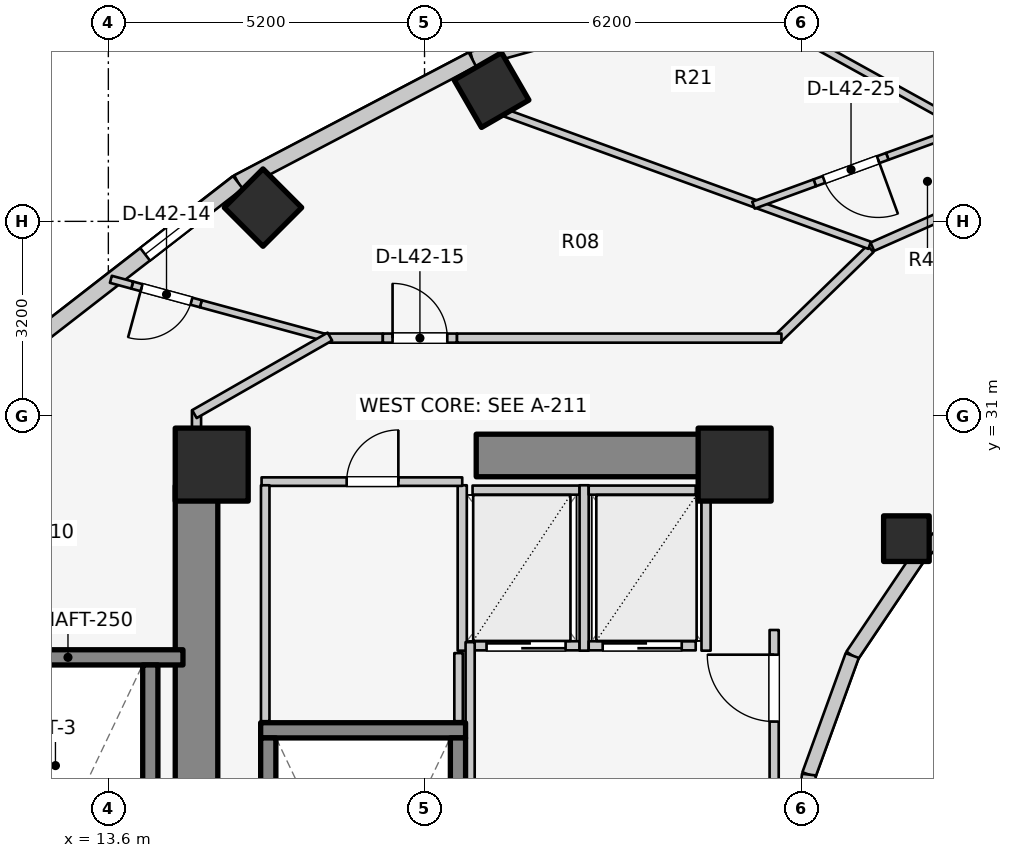
"""IFC4 building model, lengths in metres.
Left out: names, types, materials, properties, quantities, classifications, styles, units other than length and angle.
Written with IfcOpenShell. Run it as: python <this file> out.ifc"""

import sys

from ifc_helpers import new_model, si_unit, direction, frame, frame_2d, origin, origin_2d, place, context, subcontext, project, spatial, rectangle, extrude, element, fill, save


model = new_model("IFC4")
c1 = context("Model", 3, precision=1e-05, world=origin(), true_north=direction((0.0, 1.0)))
c2 = subcontext(c1, "Body", "Model", "MODEL_VIEW")
j1 = project(units=[si_unit("LENGTHUNIT", "METRE"), si_unit("PLANEANGLEUNIT", "RADIAN")], contexts=[c1])
p1 = place(None, origin())
s1 = spatial("IfcSite", under=j1, at=p1, CompositionType="ELEMENT")
p2 = place(p1, origin())
s2 = spatial("IfcBuilding", under=s1, at=p2, CompositionType="ELEMENT")
p3 = place(p2, frame((0.0, 0.0, 140.5)))
s3 = spatial("IfcBuildingStorey", under=s2, at=p3, CompositionType="ELEMENT", Elevation=140.5)
p4 = place(p3, frame((15.05, 17.05, 0.0), z_axis=(0.0, 0.0, 1.0), x_axis=(0.0, 1.0, 0.0)))
e1 = element("IfcWall", 1, at=p4, inside=s3, PredefinedType="SHEAR", context=c2, shape_type="SweptSolid", body=[
    extrude(rectangle(XDim=12.8, YDim=0.7, at=frame_2d((6.4, 0.0))), origin(), (0.0, 0.0, 1.0), 3.1),
])
p5 = place(p3, frame((19.65, 30.35, 0.0), z_axis=(0.0, 0.0, 1.0), x_axis=(1.0, 0.0, 0.0)))
e2 = element("IfcWall", 2, at=p5, inside=s3, PredefinedType="SHEAR", context=c2, shape_type="SweptSolid", body=[
    extrude(rectangle(XDim=4.5, YDim=0.7, at=frame_2d((2.25, 0.0))), origin(), (0.0, 0.0, 1.0), 3.1),
])
p6 = place(p3, frame((16.105, 25.83, 0.0), z_axis=(0.0, 0.0, 1.0), x_axis=(1.0, 0.0, 0.0)))
e3 = element("IfcWall", 3, at=p6, inside=s3, PredefinedType="SOLIDWALL", context=c2, shape_type="SweptSolid", body=[
    extrude(rectangle(XDim=3.37, YDim=0.25, at=frame_2d((1.685, 0.0))), origin(), (0.0, 0.0, 1.0), 3.1),
])
for number, where, z_axis, x_axis in (
    (4, (16.23, 17.895, 0.0), (0.0, 0.0, 1.0), (0.0, 1.0, 0.0)),
    (5, (19.35, 17.895, 0.0), (0.0, 0.0, 1.0), (0.0, 1.0, 0.0)),
):
    element("IfcWall", number, at=place(p3, frame(where, z_axis=z_axis, x_axis=x_axis)), inside=s3, PredefinedType="SOLIDWALL", context=c2, shape_type="SweptSolid", body=[
        extrude(rectangle(XDim=7.81, YDim=0.25, at=frame_2d((3.905, 0.0))), origin(), (0.0, 0.0, 1.0), 3.1),
    ])
p7 = place(p3, frame((11.045, 27.03, 0.0), z_axis=(0.0, 0.0, 1.0), x_axis=(1.0, 0.0, 0.0)))
e6 = element("IfcWall", 6, at=p7, inside=s3, PredefinedType="SOLIDWALL", context=c2, shape_type="SweptSolid", body=[
    extrude(rectangle(XDim=3.782, YDim=0.25, at=frame_2d((1.891, 0.0))), origin(), (0.0, 0.0, 1.0), 3.1),
])
p8 = place(p3, frame((14.29, 19.095, 0.0), z_axis=(0.0, 0.0, 1.0), x_axis=(0.0, 1.0, 0.0)))
e7 = element("IfcWall", 7, at=p8, inside=s3, PredefinedType="SOLIDWALL", context=c2, shape_type="SweptSolid", body=[
    extrude(rectangle(XDim=7.81, YDim=0.25, at=frame_2d((3.905, 0.0))), origin(), (0.0, 0.0, 1.0), 3.1),
])
for number, where, z_axis, x_axis in (
    (8, (23.9, 30.2, 0.0), (0.0, 0.0, 1.0), (1.0, 0.0, 0.0)),
    (9, (15.3, 30.2, 0.0), (0.0, 0.0, 1.0), (1.0, 0.0, 0.0)),
):
    element("IfcColumn", number, at=place(p3, frame(where, z_axis=z_axis, x_axis=x_axis)), inside=s3, PredefinedType="COLUMN", context=c2, shape_type="SweptSolid", body=[
        extrude(rectangle(XDim=1.2, YDim=1.2, at=origin_2d()), origin(), (0.0, 0.0, 1.0), 3.1),
    ])
p9 = place(p3, frame((19.902, 36.359, 0.0), z_axis=(0.0, 0.0, 1.0), x_axis=(-0.5, 0.866025403784, 0.0)))
e10 = element("IfcColumn", 10, at=p9, inside=s3, PredefinedType="COLUMN", context=c2, shape_type="SweptSolid", body=[
    extrude(rectangle(XDim=0.9, YDim=0.9, at=origin_2d()), origin(), (0.0, 0.0, 1.0), 3.1),
])
p10 = place(p3, frame((26.725, 28.982, 0.0), z_axis=(0.0, 0.0, 1.0), x_axis=(1.0, 0.0, 0.0)))
e11 = element("IfcColumn", 11, at=p10, inside=s3, PredefinedType="COLUMN", context=c2, shape_type="SweptSolid", body=[
    extrude(rectangle(XDim=0.75, YDim=0.75, at=origin_2d()), origin(), (0.0, 0.0, 1.0), 3.1),
])
p11 = place(p3, frame((16.143, 34.427, 0.0), z_axis=(0.0, 0.0, 1.0), x_axis=(-0.707106781187, 0.707106781187, 0.0)))
e12 = element("IfcColumn", 12, at=p11, inside=s3, PredefinedType="COLUMN", context=c2, shape_type="SweptSolid", body=[
    extrude(rectangle(XDim=0.9, YDim=0.9, at=origin_2d()), origin(), (0.0, 0.0, 1.0), 3.1),
])
p12 = place(p3, frame((28.44, 30.032, 0.0), z_axis=(0.0, 0.0, 1.0), x_axis=(-0.752576694707, -0.658504607869, 0.0)))
e13 = element("IfcWall", 13, at=p12, inside=s3, PredefinedType="STANDARD", context=c2, shape_type="SweptSolid", body=[
    extrude(rectangle(XDim=1.959, YDim=0.23, at=frame_2d((0.98, 0.0))), origin(), (0.0, 0.0, 1.0), 1.22),
])
p13 = place(p3, frame((26.965, 28.742, 0.0), z_axis=(0.0, 0.0, 1.0), x_axis=(-0.558197800898, -0.829707909492, 0.0)))
e14 = element("IfcWall", 14, at=p13, inside=s3, PredefinedType="STANDARD", context=c2, shape_type="SweptSolid", body=[
    extrude(rectangle(XDim=2.027, YDim=0.23, at=frame_2d((1.013, 0.0))), origin(), (0.0, 0.0, 1.0), 1.22),
])
p14 = place(p3, frame((25.834, 27.06, 0.0), z_axis=(0.0, 0.0, 1.0), x_axis=(-0.341423187295, -0.93990968033, 0.0)))
e15 = element("IfcWall", 15, at=p14, inside=s3, PredefinedType="STANDARD", context=c2, shape_type="SweptSolid", body=[
    extrude(rectangle(XDim=2.084, YDim=0.23, at=frame_2d((1.042, 0.0))), origin(), (0.0, 0.0, 1.0), 2.56),
])
p15 = place(p3, frame((25.123, 25.102, 0.0), z_axis=(0.0, 0.0, 1.0), x_axis=(-0.114711713601, -0.993398823617, 0.0)))
e16 = element("IfcWall", 16, at=p15, inside=s3, PredefinedType="STANDARD", context=c2, shape_type="SweptSolid", body=[
    extrude(rectangle(XDim=2.115, YDim=0.23, at=frame_2d((1.058, 0.0))), origin(), (0.0, 0.0, 1.0), 2.56),
])
p16 = place(p3, frame((24.635, 38.257, 0.0), z_axis=(0.0, 0.0, 1.0), x_axis=(-0.963953455704, -0.26607092144, 0.0)))
e17 = element("IfcWall", 17, at=p16, inside=s3, PredefinedType="STANDARD", context=c2, shape_type="SweptSolid", body=[
    extrude(rectangle(XDim=5.237, YDim=0.26, at=frame_2d((2.618, 0.0))), origin(), (0.0, 0.0, 1.0), 1.22),
])
p17 = place(p16, frame((2.018, 0.0, 0.15)))
e18 = element("IfcOpeningElement", 18, at=p17, cuts=e17, PredefinedType="OPENING", context=c2, shape_type="SweptSolid", body=[
    extrude(rectangle(XDim=1.2, YDim=0.9, at=frame_2d((0.6, 0.45))), frame((0.0, 0.14, 0.0), z_axis=(0.0, -1.0, 0.0), x_axis=(1.0, 0.0, 0.0)), (0.0, 0.0, 1.0), 0.28),
])
p18 = place(p3, frame((19.587, 36.863, 0.0), z_axis=(0.0, 0.0, 1.0), x_axis=(-0.885660265226, -0.464333818065, 0.0)))
e19 = element("IfcWall", 19, at=p18, inside=s3, PredefinedType="STANDARD", context=c2, shape_type="SweptSolid", body=[
    extrude(rectangle(XDim=4.354, YDim=0.26, at=frame_2d((2.177, 0.0))), origin(), (0.0, 0.0, 1.0), 1.22),
])
p19 = place(p3, frame((15.731, 34.842, 0.0), z_axis=(0.0, 0.0, 1.0), x_axis=(-0.790185650662, -0.612867552973, 0.0)))
e20 = element("IfcWall", 20, at=p19, inside=s3, PredefinedType="STANDARD", context=c2, shape_type="SweptSolid", body=[
    extrude(rectangle(XDim=4.239, YDim=0.26, at=frame_2d((2.12, 0.0))), origin(), (0.0, 0.0, 1.0), 1.22),
])
p20 = place(p19, frame((0.731, 0.0, 0.15)))
e21 = element("IfcOpeningElement", 21, at=p20, cuts=e20, PredefinedType="OPENING", context=c2, shape_type="SweptSolid", body=[
    extrude(rectangle(XDim=1.2, YDim=0.9, at=frame_2d((0.6, 0.45))), frame((0.0, 0.14, 0.0), z_axis=(0.0, -1.0, 0.0), x_axis=(1.0, 0.0, 0.0)), (0.0, 0.0, 1.0), 0.28),
])
p21 = place(p3, frame((19.59, 27.22, 0.0), z_axis=(0.0, 0.0, 1.0), x_axis=(1.0, 0.0, 0.0)))
e22 = element("IfcWall", 22, at=p21, inside=s3, PredefinedType="SOLIDWALL", context=c2, shape_type="SweptSolid", body=[
    extrude(rectangle(XDim=1.76, YDim=0.15, at=frame_2d((0.88, 0.0))), origin(), (0.0, 0.0, 1.0), 2.575),
])
p22 = place(p21, frame((0.23, 0.0, 0.0)))
e23 = element("IfcOpeningElement", 23, at=p22, cuts=e22, PredefinedType="OPENING", context=c2, shape_type="SweptSolid", body=[
    extrude(rectangle(XDim=1.3, YDim=2.1, at=frame_2d((0.65, 1.05))), frame((0.0, 0.085, 0.0), z_axis=(0.0, -1.0, 0.0), x_axis=(1.0, 0.0, 0.0)), (0.0, 0.0, 1.0), 0.17),
])
p23 = place(p3, frame((19.59, 29.78, 0.0), z_axis=(0.0, 0.0, 1.0), x_axis=(1.0, 0.0, 0.0)))
e24 = element("IfcWall", 24, at=p23, inside=s3, PredefinedType="SOLIDWALL", context=c2, shape_type="SweptSolid", body=[
    extrude(rectangle(XDim=1.76, YDim=0.15, at=frame_2d((0.88, 0.0))), origin(), (0.0, 0.0, 1.0), 2.575),
])
for number, where, z_axis, x_axis in (
    (25, (19.42, 27.14, 0.0), (0.0, 0.0, 1.0), (0.0, 1.0, 0.0)),
    (26, (21.425, 27.14, 0.0), (0.0, 0.0, 1.0), (0.0, 1.0, 0.0)),
):
    element("IfcWall", number, at=place(p3, frame(where, z_axis=z_axis, x_axis=x_axis)), inside=s3, PredefinedType="SOLIDWALL", context=c2, shape_type="SweptSolid", body=[
        extrude(rectangle(XDim=2.72, YDim=0.15, at=frame_2d((1.36, 0.0))), origin(), (0.0, 0.0, 1.0), 2.575),
    ])
p24 = place(p3, frame((21.5, 27.22, 0.0), z_axis=(0.0, 0.0, 1.0), x_axis=(1.0, 0.0, 0.0)))
e27 = element("IfcWall", 27, at=p24, inside=s3, PredefinedType="SOLIDWALL", context=c2, shape_type="SweptSolid", body=[
    extrude(rectangle(XDim=1.76, YDim=0.15, at=frame_2d((0.88, 0.0))), origin(), (0.0, 0.0, 1.0), 2.575),
])
p25 = place(p24, frame((0.23, 0.0, 0.0)))
e28 = element("IfcOpeningElement", 28, at=p25, cuts=e27, PredefinedType="OPENING", context=c2, shape_type="SweptSolid", body=[
    extrude(rectangle(XDim=1.3, YDim=2.1, at=frame_2d((0.65, 1.05))), frame((0.0, 0.085, 0.0), z_axis=(0.0, -1.0, 0.0), x_axis=(1.0, 0.0, 0.0)), (0.0, 0.0, 1.0), 0.17),
])
p26 = place(p3, frame((21.5, 29.78, 0.0), z_axis=(0.0, 0.0, 1.0), x_axis=(1.0, 0.0, 0.0)))
e29 = element("IfcWall", 29, at=p26, inside=s3, PredefinedType="SOLIDWALL", context=c2, shape_type="SweptSolid", body=[
    extrude(rectangle(XDim=1.76, YDim=0.15, at=frame_2d((0.88, 0.0))), origin(), (0.0, 0.0, 1.0), 2.575),
])
p27 = place(p3, frame((23.43, 27.14, 0.0), z_axis=(0.0, 0.0, 1.0), x_axis=(0.0, 1.0, 0.0)))
e30 = element("IfcWall", 30, at=p27, inside=s3, PredefinedType="SOLIDWALL", context=c2, shape_type="SweptSolid", body=[
    extrude(rectangle(XDim=2.72, YDim=0.15, at=frame_2d((1.36, 0.0))), origin(), (0.0, 0.0, 1.0), 2.575),
])
p28 = place(p3, frame((19.55, 24.08, 0.0), z_axis=(0.0, 0.0, 1.0), x_axis=(0.0, 1.0, 0.0)))
e31 = element("IfcWall", 31, at=p28, inside=s3, PredefinedType="PARTITIONING", context=c2, shape_type="SweptSolid", body=[
    extrude(rectangle(XDim=3.2, YDim=0.15, at=frame_2d((1.6, 0.0))), origin(), (0.0, 0.0, 1.0), 2.575),
])
p29 = place(p3, frame((24.55, 24.08, 0.0), z_axis=(0.0, 0.0, 1.0), x_axis=(0.0, 1.0, 0.0)))
e32 = element("IfcWall", 32, at=p29, inside=s3, PredefinedType="PARTITIONING", context=c2, shape_type="SweptSolid", body=[
    extrude(rectangle(XDim=3.4, YDim=0.15, at=frame_2d((1.7, 0.0))), origin(), (0.0, 0.0, 1.0), 2.575),
])
p30 = place(p29, frame((1.894, 0.0, 0.0)))
e33 = element("IfcOpeningElement", 33, at=p30, cuts=e32, PredefinedType="OPENING", context=c2, shape_type="SweptSolid", body=[
    extrude(rectangle(XDim=1.1, YDim=2.1, at=frame_2d((0.55, 1.05))), frame((0.0, 0.085, 0.0), z_axis=(0.0, -1.0, 0.0), x_axis=(1.0, 0.0, 0.0)), (0.0, 0.0, 1.0), 0.17),
])
p31 = place(p3, frame((16.12, 29.92, 0.0), z_axis=(0.0, 0.0, 1.0), x_axis=(1.0, 0.0, 0.0)))
e34 = element("IfcWall", 34, at=p31, inside=s3, PredefinedType="PLUMBINGWALL", context=c2, shape_type="SweptSolid", body=[
    extrude(rectangle(XDim=3.3, YDim=0.14, at=frame_2d((1.65, 0.0))), origin(), (0.0, 0.0, 1.0), 2.575),
])
p32 = place(p31, frame((1.399, 0.0, 0.0)))
e35 = element("IfcOpeningElement", 35, at=p32, cuts=e34, PredefinedType="OPENING", context=c2, shape_type="SweptSolid", body=[
    extrude(rectangle(XDim=0.85, YDim=2.05, at=frame_2d((0.425, 1.025))), frame((0.0, 0.08, 0.0), z_axis=(0.0, -1.0, 0.0), x_axis=(1.0, 0.0, 0.0)), (0.0, 0.0, 1.0), 0.16),
])
p33 = place(p3, frame((16.18, 25.98, 0.0), z_axis=(0.0, 0.0, 1.0), x_axis=(0.0, 1.0, 0.0)))
e36 = element("IfcWall", 36, at=p33, inside=s3, PredefinedType="PLUMBINGWALL", context=c2, shape_type="SweptSolid", body=[
    extrude(rectangle(XDim=3.88, YDim=0.14, at=frame_2d((1.94, 0.0))), origin(), (0.0, 0.0, 1.0), 2.575),
])
p34 = place(p3, frame((19.36, 25.98, 0.0), z_axis=(0.0, 0.0, 1.0), x_axis=(0.0, 1.0, 0.0)))
e37 = element("IfcWall", 37, at=p34, inside=s3, PredefinedType="PLUMBINGWALL", context=c2, shape_type="SweptSolid", body=[
    extrude(rectangle(XDim=1.12, YDim=0.14, at=frame_2d((0.56, 0.0))), origin(), (0.0, 0.0, 1.0), 2.575),
])
p35 = place(p3, frame((15.05, 29.8, 0.0), z_axis=(0.0, 0.0, 1.0), x_axis=(0.0, 1.0, 0.0)))
e38 = element("IfcWall", 38, at=p35, inside=s3, PredefinedType="PARTITIONING", context=c2, shape_type="SweptSolid", body=[
    extrude(rectangle(XDim=1.29, YDim=0.15, at=frame_2d((0.645, 0.0))), origin(), (0.0, 0.0, 1.0), 1.22),
])
p36 = place(p3, frame((17.248, 32.267, 0.0), z_axis=(0.0, 0.0, 1.0), x_axis=(-0.964996026859, 0.262264500356, 0.0)))
e39 = element("IfcWall", 39, at=p36, inside=s3, PredefinedType="MOVABLE", context=c2, shape_type="SweptSolid", body=[
    extrude(rectangle(XDim=2.204, YDim=0.12, at=frame_2d((1.102, 0.0))), origin(), (0.0, 0.0, 1.0), 1.22),
])
p37 = place(p3, frame((15.121, 32.845, 0.0), z_axis=(0.0, 0.0, 1.0), x_axis=(-0.964994566257, 0.262269874548, 0.0)))
e40 = element("IfcWall", 40, at=p37, inside=s3, PredefinedType="MOVABLE", context=c2, shape_type="SweptSolid", body=[
    extrude(rectangle(XDim=1.17, YDim=0.12, at=frame_2d((0.585, 0.0))), origin(), (0.0, 0.0, 1.0), 2.575),
])
p38 = place(p37, frame((0.16, 0.0, 0.0)))
e41 = element("IfcOpeningElement", 41, at=p38, cuts=e40, PredefinedType="OPENING", context=c2, shape_type="SweptSolid", body=[
    extrude(rectangle(XDim=0.85, YDim=2.05, at=frame_2d((0.425, 1.025))), frame((0.0, 0.07, 0.0), z_axis=(0.0, -1.0, 0.0), x_axis=(1.0, 0.0, 0.0)), (0.0, 0.0, 1.0), 0.14),
])
p39 = place(p3, frame((13.992, 33.152, 0.0), z_axis=(0.0, 0.0, 1.0), x_axis=(-0.964996222189, 0.26226378164, 0.0)))
e42 = element("IfcWall", 42, at=p39, inside=s3, PredefinedType="MOVABLE", context=c2, shape_type="SweptSolid", body=[
    extrude(rectangle(XDim=0.363, YDim=0.12, at=frame_2d((0.182, 0.0))), origin(), (0.0, 0.0, 1.0), 2.575),
])
p40 = place(p3, frame((26.133, 33.749, 0.0), z_axis=(0.0, 0.0, 1.0), x_axis=(-0.717419568599, -0.696641344302, 0.0)))
e43 = element("IfcWall", 43, at=p40, inside=s3, PredefinedType="PARTITIONING", context=c2, shape_type="SweptSolid", body=[
    extrude(rectangle(XDim=2.138, YDim=0.15, at=frame_2d((1.069, 0.0))), origin(), (0.0, 0.0, 1.0), 1.22),
])
p41 = place(p3, frame((17.15, 32.28, 0.0), z_axis=(0.0, 0.0, 1.0), x_axis=(1.0, 0.0, 0.0)))
e44 = element("IfcWall", 44, at=p41, inside=s3, PredefinedType="PARTITIONING", context=c2, shape_type="SweptSolid", body=[
    extrude(rectangle(XDim=0.964, YDim=0.15, at=frame_2d((0.482, 0.0))), origin(), (0.0, 0.0, 1.0), 2.575),
])
p42 = place(p3, frame((18.114, 32.28, 0.0), z_axis=(0.0, 0.0, 1.0), x_axis=(1.0, 0.0, 0.0)))
e45 = element("IfcWall", 45, at=p42, inside=s3, PredefinedType="PARTITIONING", context=c2, shape_type="SweptSolid", body=[
    extrude(rectangle(XDim=1.22, YDim=0.15, at=frame_2d((0.61, 0.0))), origin(), (0.0, 0.0, 1.0), 2.16),
])
p43 = place(p42, frame((0.16, 0.0, 0.0)))
e46 = element("IfcOpeningElement", 46, at=p43, cuts=e45, PredefinedType="OPENING", context=c2, shape_type="SweptSolid", body=[
    extrude(rectangle(XDim=0.9, YDim=2.1, at=frame_2d((0.45, 1.05))), frame((0.0, 0.085, 0.0), z_axis=(0.0, -1.0, 0.0), x_axis=(1.0, 0.0, 0.0)), (0.0, 0.0, 1.0), 0.17),
])
p44 = place(p3, frame((19.334, 32.28, 0.0), z_axis=(0.0, 0.0, 1.0), x_axis=(1.0, 0.0, 0.0)))
e47 = element("IfcWall", 47, at=p44, inside=s3, PredefinedType="PARTITIONING", context=c2, shape_type="SweptSolid", body=[
    extrude(rectangle(XDim=5.336, YDim=0.15, at=frame_2d((2.668, 0.0))), origin(), (0.0, 0.0, 1.0), 1.22),
])
p45 = place(p3, frame((17.243, 32.305, 0.0), z_axis=(0.0, 0.0, 1.0), x_axis=(-0.867991349648, -0.496579315857, 0.0)))
e48 = element("IfcWall", 48, at=p45, inside=s3, PredefinedType="PARTITIONING", context=c2, shape_type="SweptSolid", body=[
    extrude(rectangle(XDim=2.567, YDim=0.15, at=frame_2d((1.283, 0.0))), origin(), (0.0, 0.0, 1.0), 1.22),
])
p46 = place(p3, frame((28.935, 35.058, 0.0), z_axis=(0.0, 0.0, 1.0), x_axis=(-0.875077338582, 0.48398311076, 0.0)))
e49 = element("IfcWall", 49, at=p46, inside=s3, PredefinedType="PARTITIONING", context=c2, shape_type="SweptSolid", body=[
    extrude(rectangle(XDim=4.573, YDim=0.125, at=frame_2d((2.287, 0.0))), origin(), (0.0, 0.0, 1.0), 1.22),
])
p47 = place(p3, frame((26.12, 33.806, 0.0), z_axis=(0.0, 0.0, 1.0), x_axis=(-0.939901628116, 0.341445353557, 0.0)))
e50 = element("IfcWall", 50, at=p47, inside=s3, PredefinedType="PARTITIONING", context=c2, shape_type="SweptSolid", body=[
    extrude(rectangle(XDim=6.387, YDim=0.125, at=frame_2d((3.194, 0.0))), origin(), (0.0, 0.0, 1.0), 1.22),
])
p48 = place(p3, frame((27.749, 35.757, 0.0), z_axis=(0.0, 0.0, 1.0), x_axis=(-0.939467704653, -0.342637464259, 0.0)))
e51 = element("IfcWall", 51, at=p48, inside=s3, PredefinedType="MOVABLE", context=c2, shape_type="SweptSolid", body=[
    extrude(rectangle(XDim=1.424, YDim=0.12, at=frame_2d((0.712, 0.0))), origin(), (0.0, 0.0, 1.0), 1.22),
])
p49 = place(p3, frame((26.411, 35.269, 0.0), z_axis=(0.0, 0.0, 1.0), x_axis=(-0.939428071916, -0.34274611259, 0.0)))
e52 = element("IfcWall", 52, at=p49, inside=s3, PredefinedType="MOVABLE", context=c2, shape_type="SweptSolid", body=[
    extrude(rectangle(XDim=1.27, YDim=0.12, at=frame_2d((0.635, 0.0))), origin(), (0.0, 0.0, 1.0), 2.16),
])
p50 = place(p49, frame((0.16, 0.0, 0.0)))
e53 = element("IfcOpeningElement", 53, at=p50, cuts=e52, PredefinedType="OPENING", context=c2, shape_type="SweptSolid", body=[
    extrude(rectangle(XDim=0.95, YDim=2.1, at=frame_2d((0.475, 1.05))), frame((0.0, 0.07, 0.0), z_axis=(0.0, -1.0, 0.0), x_axis=(1.0, 0.0, 0.0)), (0.0, 0.0, 1.0), 0.14),
])
p51 = place(p3, frame((25.218, 34.834, 0.0), z_axis=(0.0, 0.0, 1.0), x_axis=(-0.939387563121, -0.342857122214, 0.0)))
e54 = element("IfcWall", 54, at=p51, inside=s3, PredefinedType="MOVABLE", context=c2, shape_type="SweptSolid", body=[
    extrude(rectangle(XDim=1.073, YDim=0.12, at=frame_2d((0.537, 0.0))), origin(), (0.0, 0.0, 1.0), 2.575),
])
p52 = place(p3, frame((27.768, 34.492, 0.0), z_axis=(0.0, 0.0, 1.0), x_axis=(-0.91447091359, -0.404651638077, 0.0)))
e55 = element("IfcWall", 55, at=p52, inside=s3, PredefinedType="PARTITIONING", context=c2, shape_type="SweptSolid", body=[
    extrude(rectangle(XDim=1.753, YDim=0.15, at=frame_2d((0.876, 0.0))), origin(), (0.0, 0.0, 1.0), 1.22),
])
p53 = place(p20, origin())
e56 = element("IfcWindow", 56, at=p53, inside=s3, PartitioningType="SINGLE_PANEL", PredefinedType="WINDOW", context=c2, shape_type="SweptSolid", body=[
    extrude(rectangle(XDim=1.2, YDim=0.9, at=frame_2d((0.6, 0.45))), frame((0.0, 0.03, 0.0), z_axis=(0.0, -1.0, 0.0), x_axis=(1.0, 0.0, 0.0)), (0.0, 0.0, 1.0), 0.06),
])
fill(e21, e56)
p54 = place(p22, origin())
e57 = element("IfcDoor", 57, at=p54, inside=s3, OperationType="DOUBLE_DOOR_SLIDING", PredefinedType="DOOR", context=c2, shape_type="SweptSolid", body=[
    extrude(rectangle(XDim=1.3, YDim=2.1, at=frame_2d((0.65, 1.05))), frame((0.0, 0.025, 0.0), z_axis=(0.0, -1.0, 0.0), x_axis=(1.0, 0.0, 0.0)), (0.0, 0.0, 1.0), 0.05),
])
fill(e23, e57)
p55 = place(p25, origin())
e58 = element("IfcDoor", 58, at=p55, inside=s3, OperationType="DOUBLE_DOOR_SLIDING", PredefinedType="DOOR", context=c2, shape_type="SweptSolid", body=[
    extrude(rectangle(XDim=1.3, YDim=2.1, at=frame_2d((0.65, 1.05))), frame((0.0, 0.025, 0.0), z_axis=(0.0, -1.0, 0.0), x_axis=(1.0, 0.0, 0.0)), (0.0, 0.0, 1.0), 0.05),
])
fill(e28, e58)
p56 = place(p30, origin())
e59 = element("IfcDoor", 59, at=p56, inside=s3, OperationType="SINGLE_SWING_RIGHT", PredefinedType="DOOR", context=c2, shape_type="SweptSolid", body=[
    extrude(rectangle(XDim=1.1, YDim=2.1, at=frame_2d((0.55, 1.05))), frame((0.0, 0.025, 0.0), z_axis=(0.0, -1.0, 0.0), x_axis=(1.0, 0.0, 0.0)), (0.0, 0.0, 1.0), 0.05),
])
fill(e33, e59)
p57 = place(p32, origin())
e60 = element("IfcDoor", 60, at=p57, inside=s3, OperationType="SINGLE_SWING_RIGHT", PredefinedType="DOOR", context=c2, shape_type="SweptSolid", body=[
    extrude(rectangle(XDim=0.85, YDim=2.05, at=frame_2d((0.425, 1.025))), frame((0.0, 0.025, 0.0), z_axis=(0.0, -1.0, 0.0), x_axis=(1.0, 0.0, 0.0)), (0.0, 0.0, 1.0), 0.05),
])
fill(e35, e60)
p58 = place(p38, origin())
e61 = element("IfcDoor", 61, at=p58, inside=s3, OperationType="SINGLE_SWING_RIGHT", PredefinedType="DOOR", context=c2, shape_type="SweptSolid", body=[
    extrude(rectangle(XDim=0.85, YDim=2.05, at=frame_2d((0.425, 1.025))), frame((0.0, 0.025, 0.0), z_axis=(0.0, -1.0, 0.0), x_axis=(1.0, 0.0, 0.0)), (0.0, 0.0, 1.0), 0.05),
])
fill(e41, e61)
p59 = place(p43, origin())
e62 = element("IfcDoor", 62, at=p59, inside=s3, OperationType="SINGLE_SWING_LEFT", PredefinedType="DOOR", context=c2, shape_type="SweptSolid", body=[
    extrude(rectangle(XDim=0.9, YDim=2.1, at=frame_2d((0.45, 1.05))), frame((0.0, 0.025, 0.0), z_axis=(0.0, -1.0, 0.0), x_axis=(1.0, 0.0, 0.0)), (0.0, 0.0, 1.0), 0.05),
])
fill(e46, e62)
p60 = place(p50, origin())
e63 = element("IfcDoor", 63, at=p60, inside=s3, OperationType="SINGLE_SWING_LEFT", PredefinedType="DOOR", context=c2, shape_type="SweptSolid", body=[
    extrude(rectangle(XDim=0.95, YDim=2.1, at=frame_2d((0.475, 1.05))), frame((0.0, 0.025, 0.0), z_axis=(0.0, -1.0, 0.0), x_axis=(1.0, 0.0, 0.0)), (0.0, 0.0, 1.0), 0.05),
])
fill(e53, e63)
save(model, sys.argv[1])
